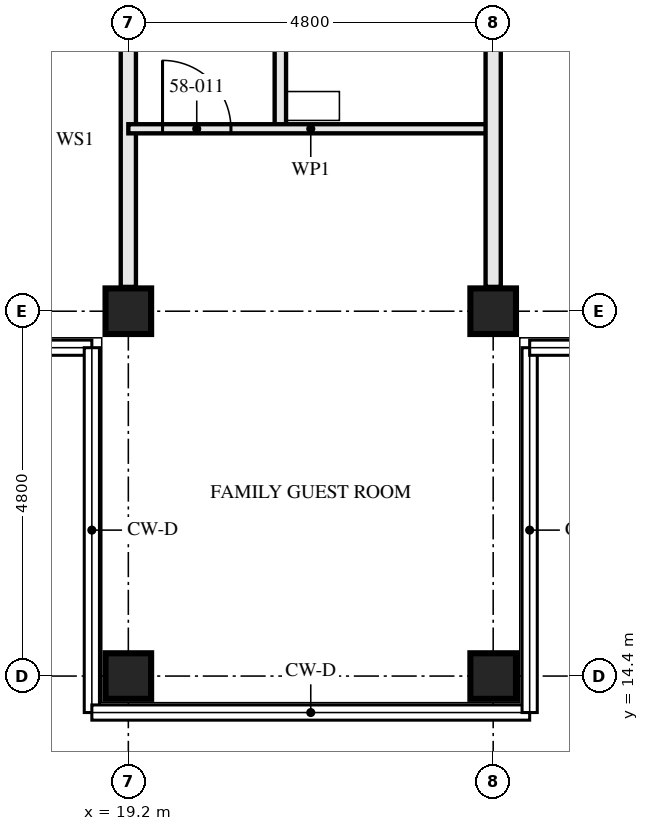
"""IFC4 building model, lengths in metres.
Left out: names, types, materials, properties, quantities, classifications, styles, units other than length and angle.
Written with IfcOpenShell. Run it as: python <this file> out.ifc"""

import sys

from ifc_helpers import new_model, si_unit, direction, frame, frame_2d, origin, origin_2d, place, context, subcontext, project, spatial, rectangle, hollow_rectangle, extrude, element, fill, save


model = new_model("IFC4")
c1 = context("Model", 3, precision=1e-05, world=origin(), true_north=direction((0.0, 1.0)))
c2 = subcontext(c1, "Body", "Model", "MODEL_VIEW")
j1 = project(units=[si_unit("LENGTHUNIT", "METRE"), si_unit("PLANEANGLEUNIT", "RADIAN")], contexts=[c1])
p1 = place(None, origin())
s1 = spatial("IfcSite", under=j1, at=p1, CompositionType="ELEMENT")
p2 = place(p1, origin())
s2 = spatial("IfcBuilding", under=s1, at=p2, CompositionType="ELEMENT")
p3 = place(p2, frame((0.0, 0.0, 212.0)))
s3 = spatial("IfcBuildingStorey", under=s2, at=p3, CompositionType="ELEMENT", Elevation=212.0)
for number, where, z_axis, x_axis in (
    (1, (19.2, 14.4, 0.0), (0.0, 0.0, 1.0), (0.0, 1.0, 0.0)),
    (2, (19.2, 19.2, 0.0), (0.0, 0.0, 1.0), (0.0, 1.0, 0.0)),
    (3, (24.0, 14.4, 0.0), (0.0, 0.0, 1.0), (0.0, 1.0, 0.0)),
    (4, (24.0, 19.2, 0.0), (0.0, 0.0, 1.0), (0.0, 1.0, 0.0)),
):
    element("IfcColumn", number, at=place(p3, frame(where, z_axis=z_axis, x_axis=x_axis)), inside=s3, PredefinedType="COLUMN", context=c2, shape_type="SweptSolid", body=[
        extrude(hollow_rectangle(XDim=0.6, YDim=0.6, WallThickness=0.05, at=origin_2d()), origin(), (0.0, 0.0, 1.0), 3.5),
    ])
p4 = place(p3, frame((19.2, 19.52, 0.0), z_axis=(0.0, 0.0, 1.0), x_axis=(0.0, 1.0, 0.0)))
e5 = element("IfcWall", 5, at=p4, inside=s3, PredefinedType="PARTITIONING", context=c2, shape_type="SweptSolid", body=[
    extrude(rectangle(XDim=6.68, YDim=0.2, at=frame_2d((3.34, 0.0))), origin(), (0.0, 0.0, 1.0), 2.55),
])
p5 = place(p3, frame((21.2, 21.6, 0.0), z_axis=(0.0, 0.0, 1.0), x_axis=(0.0, 1.0, 0.0)))
e6 = element("IfcWall", 6, at=p5, inside=s3, PredefinedType="PARTITIONING", context=c2, shape_type="SweptSolid", body=[
    extrude(rectangle(XDim=3.0, YDim=0.15, at=frame_2d((1.5, 0.0))), origin(), (0.0, 0.0, 1.0), 2.55),
])
p6 = place(p5, frame((1.05, 0.0, 0.0)))
e7 = element("IfcOpeningElement", 7, at=p6, cuts=e6, PredefinedType="OPENING", context=c2, shape_type="SweptSolid", body=[
    extrude(rectangle(XDim=0.9, YDim=2.1, at=frame_2d((0.45, 1.05))), frame((0.0, 0.085, 0.0), z_axis=(0.0, -1.0, 0.0), x_axis=(1.0, 0.0, 0.0)), (0.0, 0.0, 1.0), 0.171),
])
p7 = place(p3, frame((19.2, 21.6, 0.0), z_axis=(0.0, 0.0, 1.0), x_axis=(1.0, 0.0, 0.0)))
e8 = element("IfcWall", 8, at=p7, inside=s3, PredefinedType="PARTITIONING", context=c2, shape_type="SweptSolid", body=[
    extrude(rectangle(XDim=4.8, YDim=0.12, at=frame_2d((2.4, 0.0))), origin(), (0.0, 0.0, 1.0), 3.33),
])
p8 = place(p7, frame((0.45, 0.0, 0.0)))
e9 = element("IfcOpeningElement", 9, at=p8, cuts=e8, PredefinedType="OPENING", context=c2, shape_type="SweptSolid", body=[
    extrude(rectangle(XDim=0.9, YDim=2.1, at=frame_2d((0.45, 1.05))), frame((0.0, 0.071, 0.0), z_axis=(0.0, -1.0, 0.0), x_axis=(1.0, 0.0, 0.0)), (0.0, 0.0, 1.0), 0.141),
])
p9 = place(p3, frame((24.0, 19.52, 0.0), z_axis=(0.0, 0.0, 1.0), x_axis=(0.0, 1.0, 0.0)))
e10 = element("IfcWall", 10, at=p9, inside=s3, PredefinedType="PARTITIONING", context=c2, shape_type="SweptSolid", body=[
    extrude(rectangle(XDim=6.68, YDim=0.2, at=frame_2d((3.34, 0.0))), origin(), (0.0, 0.0, 1.0), 2.55),
])
p10 = place(p8, origin())
e11 = element("IfcDoor", 11, at=p10, inside=s3, OperationType="SINGLE_SWING_RIGHT", PredefinedType="DOOR", context=c2, shape_type="SweptSolid", body=[
    extrude(rectangle(XDim=0.9, YDim=2.1, at=frame_2d((0.45, 1.05))), frame((0.0, 0.022, 0.0), z_axis=(0.0, -1.0, 0.0), x_axis=(1.0, 0.0, 0.0)), (0.0, 0.0, 1.0), 0.044),
])
fill(e9, e11)
save(model, sys.argv[1])
